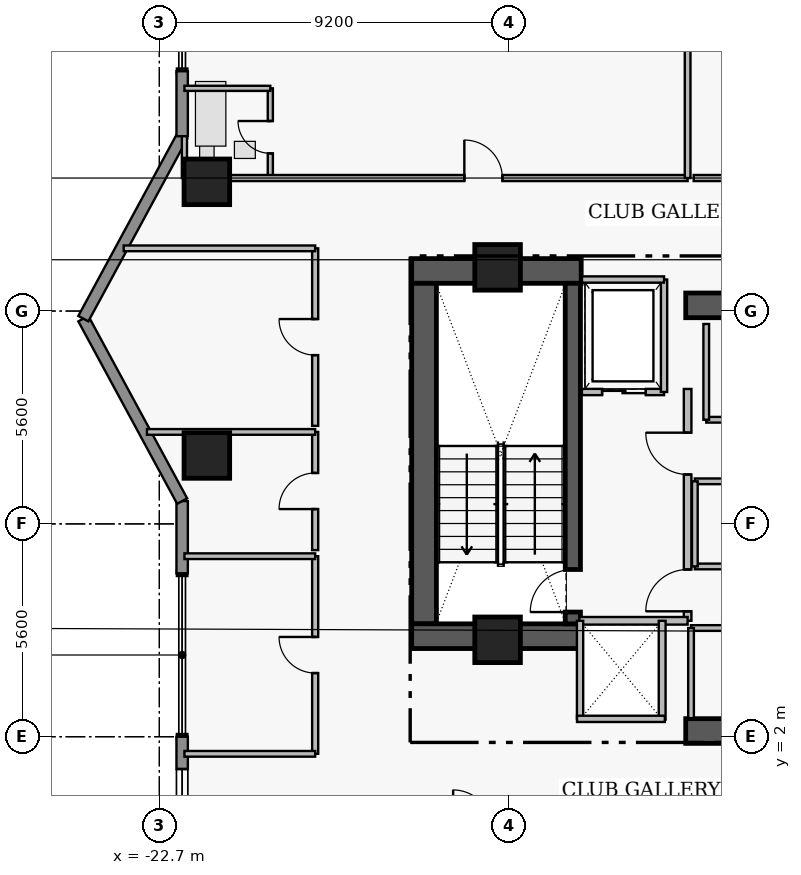
"""IFC4 building model, lengths in metres.
Left out: names, types, materials, properties, quantities, classifications, styles, units other than length and angle.
Written with IfcOpenShell. Run it as: python <this file> out.ifc"""

import sys

from ifc_helpers import new_model, si_unit, direction, frame, frame_2d, origin, origin_2d, place, context, subcontext, project, spatial, rectangle, extrude, element, fill, save


model = new_model("IFC4")
c1 = context("Model", 3, precision=1e-05, world=origin(), true_north=direction((0.0, 1.0)))
c2 = subcontext(c1, "Body", "Model", "MODEL_VIEW")
j1 = project(units=[si_unit("LENGTHUNIT", "METRE"), si_unit("PLANEANGLEUNIT", "RADIAN")], contexts=[c1])
p1 = place(None, origin())
s1 = spatial("IfcSite", under=j1, at=p1, CompositionType="ELEMENT")
p2 = place(p1, origin())
s2 = spatial("IfcBuilding", under=s1, at=p2, CompositionType="ELEMENT")
p3 = place(p2, frame((0.0, 0.0, 226.15)))
s3 = spatial("IfcBuildingStorey", under=s2, at=p3, CompositionType="ELEMENT", Elevation=226.15)
p4 = place(p3, frame((-16.06, 14.255, 0.0), z_axis=(0.0, 0.0, 1.0), x_axis=(1.0, 0.0, 0.0)))
e1 = element("IfcWall", 1, at=p4, inside=s3, PredefinedType="SHEAR", context=c2, shape_type="SweptSolid", body=[
    extrude(rectangle(XDim=4.46, YDim=0.65, at=frame_2d((2.23, 0.0))), origin(), (0.0, 0.0, 1.0), 3.56),
])
p5 = place(p3, frame((-15.735, 4.97, 0.0), z_axis=(0.0, 0.0, 1.0), x_axis=(0.0, 1.0, 0.0)))
e2 = element("IfcWall", 2, at=p5, inside=s3, PredefinedType="SHEAR", context=c2, shape_type="SweptSolid", body=[
    extrude(rectangle(XDim=8.96, YDim=0.65, at=frame_2d((4.48, 0.0))), origin(), (0.0, 0.0, 1.0), 3.56),
])
p6 = place(p3, frame((-16.06, 4.645, 0.0), z_axis=(0.0, 0.0, 1.0), x_axis=(1.0, 0.0, 0.0)))
e3 = element("IfcWall", 3, at=p6, inside=s3, PredefinedType="SHEAR", context=c2, shape_type="SweptSolid", body=[
    extrude(rectangle(XDim=4.46, YDim=0.65, at=frame_2d((2.23, 0.0))), origin(), (0.0, 0.0, 1.0), 3.56),
])
for number, where, z_axis, x_axis in (
    (4, (-8.85, 2.15, 0.0), (0.0, 0.0, 1.0), (1.0, 0.0, 0.0)),
    (5, (-8.85, 13.35, 0.0), (0.0, 0.0, 1.0), (1.0, 0.0, 0.0)),
):
    element("IfcWall", number, at=place(p3, frame(where, z_axis=z_axis, x_axis=x_axis)), inside=s3, PredefinedType="SHEAR", context=c2, shape_type="SweptSolid", body=[
        extrude(rectangle(XDim=7.6, YDim=0.65, at=frame_2d((3.8, 0.0))), origin(), (0.0, 0.0, 1.0), 3.53),
    ])
p7 = place(p3, frame((-11.82, 4.97, 0.0), z_axis=(0.0, 0.0, 1.0), x_axis=(0.0, 1.0, 0.0)))
e6 = element("IfcWall", 6, at=p7, inside=s3, PredefinedType="SHEAR", context=c2, shape_type="SweptSolid", body=[
    extrude(rectangle(XDim=8.96, YDim=0.4, at=frame_2d((4.48, 0.0))), origin(), (0.0, 0.0, 1.0), 3.56),
])
p8 = place(p7, frame((0.31, 0.0, 0.0)))
e7 = element("IfcOpeningElement", 7, at=p8, cuts=e6, PredefinedType="OPENING", context=c2, shape_type="SweptSolid", body=[
    extrude(rectangle(XDim=1.12, YDim=2.22, at=frame_2d((0.56, 1.11))), frame((0.0, 0.21, 0.0), z_axis=(0.0, -1.0, 0.0), x_axis=(1.0, 0.0, 0.0)), (0.0, 0.0, 1.0), 0.42),
])
for number, where, z_axis, x_axis in (
    (8, (-13.8, 14.35, 0.0), (0.0, 0.0, 1.0), (1.0, 0.0, 0.0)),
    (9, (-13.8, 4.55, 0.0), (0.0, 0.0, 1.0), (1.0, 0.0, 0.0)),
    (10, (-21.45, 9.4, 0.0), (0.0, 0.0, 1.0), (1.0, 0.0, 0.0)),
    (11, (-21.45, 16.6, 0.0), (0.0, 0.0, 1.0), (1.0, 0.0, 0.0)),
):
    element("IfcColumn", number, at=place(p3, frame(where, z_axis=z_axis, x_axis=x_axis)), inside=s3, PredefinedType="COLUMN", context=c2, shape_type="SweptSolid", body=[
        extrude(rectangle(XDim=1.2, YDim=1.2, at=origin_2d()), origin(), (0.0, 0.0, 1.0), 3.75),
    ])
p9 = place(p3, frame((-22.1, -4.2, 0.0), z_axis=(0.0, 0.0, 1.0), x_axis=(0.0, 1.0, 0.0)))
e12 = element("IfcWall", 12, at=p9, inside=s3, PredefinedType="STANDARD", context=c2, shape_type="SweptSolid", body=[
    extrude(rectangle(XDim=6.2, YDim=0.3, at=frame_2d((3.1, 0.0))), origin(), (0.0, 0.0, 1.0), 3.53),
])
p10 = place(p9, frame((2.045, 0.0, 0.95)))
e13 = element("IfcOpeningElement", 13, at=p10, cuts=e12, PredefinedType="OPENING", context=c2, shape_type="SweptSolid", body=[
    extrude(rectangle(XDim=1.15, YDim=1.55, at=frame_2d((0.575, 0.775))), frame((0.0, 0.16, 0.0), z_axis=(0.0, -1.0, 0.0), x_axis=(1.0, 0.0, 0.0)), (0.0, 0.0, 1.0), 0.32),
])
p11 = place(p9, frame((4.2, 0.0, 0.95)))
e14 = element("IfcOpeningElement", 14, at=p11, cuts=e12, PredefinedType="OPENING", context=c2, shape_type="SweptSolid", body=[
    extrude(rectangle(XDim=1.15, YDim=1.55, at=frame_2d((0.575, 0.775))), frame((0.0, 0.16, 0.0), z_axis=(0.0, -1.0, 0.0), x_axis=(1.0, 0.0, 0.0)), (0.0, 0.0, 1.0), 0.32),
])
p12 = place(p3, frame((-22.1, 6.3, 0.0), z_axis=(0.0, 0.0, 1.0), x_axis=(0.0, 1.0, 0.0)))
e15 = element("IfcWall", 15, at=p12, inside=s3, PredefinedType="STANDARD", context=c2, shape_type="SweptSolid", body=[
    extrude(rectangle(XDim=1.9, YDim=0.3, at=frame_2d((0.95, 0.0))), origin(), (0.0, 0.0, 1.0), 3.53),
])
for number, where, z_axis, x_axis in (
    (16, (-22.1, 8.2, 0.0), (0.0, 0.0, 1.0), (-0.476, 0.879, 0.0)),
    (17, (-24.7, 13.0, 0.0), (0.0, 0.0, 1.0), (0.476, 0.879, 0.0)),
):
    element("IfcWall", number, at=place(p3, frame(where, z_axis=z_axis, x_axis=x_axis)), inside=s3, PredefinedType="STANDARD", context=c2, shape_type="SweptSolid", body=[
        extrude(rectangle(XDim=5.459, YDim=0.3, at=frame_2d((2.729, 0.0))), origin(), (0.0, 0.0, 1.0), 3.53),
    ])
p13 = place(p3, frame((-22.1, 17.8, 0.0), z_axis=(0.0, 0.0, 1.0), x_axis=(0.0, 1.0, 0.0)))
e18 = element("IfcWall", 18, at=p13, inside=s3, PredefinedType="STANDARD", context=c2, shape_type="SweptSolid", body=[
    extrude(rectangle(XDim=1.71, YDim=0.3, at=frame_2d((0.855, 0.0))), origin(), (0.0, 0.0, 1.0), 3.53),
])
p14 = place(p3, frame((-8.8, 5.05, 0.0), z_axis=(0.0, 0.0, 1.0), x_axis=(0.0, 1.0, 0.0)))
e19 = element("IfcWall", 19, at=p14, inside=s3, PredefinedType="PARTITIONING", context=c2, shape_type="SweptSolid", body=[
    extrude(rectangle(XDim=6.1, YDim=0.2, at=frame_2d((3.05, 0.0))), origin(), (0.0, 0.0, 1.0), 3.53),
])
p15 = place(p14, frame((0.25, 0.0, 0.0)))
e20 = element("IfcOpeningElement", 20, at=p15, cuts=e19, PredefinedType="OPENING", context=c2, shape_type="SweptSolid", body=[
    extrude(rectangle(XDim=1.1, YDim=2.2, at=frame_2d((0.55, 1.1))), frame((0.0, 0.11, 0.0), z_axis=(0.0, -1.0, 0.0), x_axis=(1.0, 0.0, 0.0)), (0.0, 0.0, 1.0), 0.22),
])
p16 = place(p14, frame((3.85, 0.0, 0.0)))
e21 = element("IfcOpeningElement", 21, at=p16, cuts=e19, PredefinedType="OPENING", context=c2, shape_type="SweptSolid", body=[
    extrude(rectangle(XDim=1.1, YDim=2.2, at=frame_2d((0.55, 1.1))), frame((0.0, 0.11, 0.0), z_axis=(0.0, -1.0, 0.0), x_axis=(1.0, 0.0, 0.0)), (0.0, 0.0, 1.0), 0.22),
])
p17 = place(p3, frame((-11.58, 11.07, 0.0), z_axis=(0.0, 0.0, 1.0), x_axis=(1.0, 0.0, 0.0)))
e22 = element("IfcWall", 22, at=p17, inside=s3, PredefinedType="PARTITIONING", context=c2, shape_type="SweptSolid", body=[
    extrude(rectangle(XDim=2.16, YDim=0.165, at=frame_2d((1.08, 0.0))), origin(), (0.0, 0.0, 1.0), 3.53),
])
p18 = place(p17, frame((0.53, 0.0, 0.0)))
e23 = element("IfcOpeningElement", 23, at=p18, cuts=e22, PredefinedType="OPENING", context=c2, shape_type="SweptSolid", body=[
    extrude(rectangle(XDim=1.15, YDim=2.25, at=frame_2d((0.575, 1.125))), frame((0.0, 0.093, 0.0), z_axis=(0.0, -1.0, 0.0), x_axis=(1.0, 0.0, 0.0)), (0.0, 0.0, 1.0), 0.185),
])
p19 = place(p3, frame((-8.71, 4.86, 0.0), z_axis=(0.0, 0.0, 1.0), x_axis=(1.0, 0.0, 0.0)))
e24 = element("IfcWall", 24, at=p19, inside=s3, PredefinedType="PARTITIONING", context=c2, shape_type="SweptSolid", body=[
    extrude(rectangle(XDim=4.92, YDim=0.15, at=frame_2d((2.46, 0.0))), origin(), (0.0, 0.0, 1.0), 3.53),
])
p20 = place(p19, frame((2.01, 0.0, 0.0)))
e25 = element("IfcOpeningElement", 25, at=p20, cuts=e24, PredefinedType="OPENING", context=c2, shape_type="SweptSolid", body=[
    extrude(rectangle(XDim=0.9, YDim=2.15, at=frame_2d((0.45, 1.075))), frame((0.0, 0.085, 0.0), z_axis=(0.0, -1.0, 0.0), x_axis=(1.0, 0.0, 0.0)), (0.0, 0.0, 1.0), 0.17),
])
p21 = place(p3, frame((-8.31, 10.34, 0.0), z_axis=(0.0, 0.0, 1.0), x_axis=(1.0, 0.0, 0.0)))
e26 = element("IfcWall", 26, at=p21, inside=s3, PredefinedType="PARTITIONING", context=c2, shape_type="SweptSolid", body=[
    extrude(rectangle(XDim=4.52, YDim=0.15, at=frame_2d((2.26, 0.0))), origin(), (0.0, 0.0, 1.0), 3.53),
])
p22 = place(p21, frame((1.81, 0.0, 0.0)))
e27 = element("IfcOpeningElement", 27, at=p22, cuts=e26, PredefinedType="OPENING", context=c2, shape_type="SweptSolid", body=[
    extrude(rectangle(XDim=0.9, YDim=2.15, at=frame_2d((0.45, 1.075))), frame((0.0, 0.085, 0.0), z_axis=(0.0, -1.0, 0.0), x_axis=(1.0, 0.0, 0.0)), (0.0, 0.0, 1.0), 0.17),
])
p23 = place(p3, frame((-8.61, 8.72, 0.0), z_axis=(0.0, 0.0, 1.0), x_axis=(1.0, 0.0, 0.0)))
e28 = element("IfcWall", 28, at=p23, inside=s3, PredefinedType="PARTITIONING", context=c2, shape_type="SweptSolid", body=[
    extrude(rectangle(XDim=2.92, YDim=0.15, at=frame_2d((1.46, 0.0))), origin(), (0.0, 0.0, 1.0), 3.53),
])
p24 = place(p23, frame((1.01, 0.0, 0.0)))
e29 = element("IfcOpeningElement", 29, at=p24, cuts=e28, PredefinedType="OPENING", context=c2, shape_type="SweptSolid", body=[
    extrude(rectangle(XDim=0.9, YDim=2.15, at=frame_2d((0.45, 1.075))), frame((0.0, 0.085, 0.0), z_axis=(0.0, -1.0, 0.0), x_axis=(1.0, 0.0, 0.0)), (0.0, 0.0, 1.0), 0.17),
])
p25 = place(p3, frame((-19.78, 16.7, 0.0), z_axis=(0.0, 0.0, 1.0), x_axis=(0.0, 1.0, 0.0)))
e30 = element("IfcWall", 30, at=p25, inside=s3, PredefinedType="PLUMBINGWALL", context=c2, shape_type="SweptSolid", body=[
    extrude(rectangle(XDim=2.36, YDim=0.135, at=frame_2d((1.18, 0.0))), origin(), (0.0, 0.0, 1.0), 3.53),
])
p26 = place(p25, frame((0.65, 0.0, 0.0)))
e31 = element("IfcOpeningElement", 31, at=p26, cuts=e30, PredefinedType="OPENING", context=c2, shape_type="SweptSolid", body=[
    extrude(rectangle(XDim=0.85, YDim=2.1, at=frame_2d((0.425, 1.05))), frame((0.0, 0.077, 0.0), z_axis=(0.0, -1.0, 0.0), x_axis=(1.0, 0.0, 0.0)), (0.0, 0.0, 1.0), 0.155),
])
p27 = place(p3, frame((-22.04, 16.7, 0.0), z_axis=(0.0, 0.0, 1.0), x_axis=(1.0, 0.0, 0.0)))
e32 = element("IfcWall", 32, at=p27, inside=s3, PredefinedType="PARTITIONING", context=c2, shape_type="SweptSolid", body=[
    extrude(rectangle(XDim=13.24, YDim=0.16, at=frame_2d((6.62, 0.0))), origin(), (0.0, 0.0, 1.0), 3.124),
])
p28 = place(p27, frame((7.365, 0.0, 0.0)))
e33 = element("IfcOpeningElement", 33, at=p28, cuts=e32, PredefinedType="OPENING", context=c2, shape_type="SweptSolid", body=[
    extrude(rectangle(XDim=1.0, YDim=2.15, at=frame_2d((0.5, 1.075))), frame((0.0, 0.09, 0.0), z_axis=(0.0, -1.0, 0.0), x_axis=(1.0, 0.0, 0.0)), (0.0, 0.0, 1.0), 0.18),
])
p29 = place(p3, frame((-8.64, 16.7, 0.0), z_axis=(0.0, 0.0, 1.0), x_axis=(1.0, 0.0, 0.0)))
e34 = element("IfcWall", 34, at=p29, inside=s3, PredefinedType="PARTITIONING", context=c2, shape_type="SweptSolid", body=[
    extrude(rectangle(XDim=7.66, YDim=0.16, at=frame_2d((3.83, 0.0))), origin(), (0.0, 0.0, 1.0), 3.124),
])
p30 = place(p29, frame((5.85, 0.0, 0.0)))
e35 = element("IfcOpeningElement", 35, at=p30, cuts=e34, PredefinedType="OPENING", context=c2, shape_type="SweptSolid", body=[
    extrude(rectangle(XDim=1.08, YDim=2.18, at=frame_2d((0.54, 1.09))), frame((0.0, 0.09, 0.0), z_axis=(0.0, -1.0, 0.0), x_axis=(1.0, 0.0, 0.0)), (0.0, 0.0, 1.0), 0.18),
])
p31 = place(p3, frame((-18.6, 1.55, 0.0), z_axis=(0.0, 0.0, 1.0), x_axis=(0.0, 1.0, 0.0)))
e36 = element("IfcWall", 36, at=p31, inside=s3, PredefinedType="PARTITIONING", context=c2, shape_type="SweptSolid", body=[
    extrude(rectangle(XDim=5.2, YDim=0.16, at=frame_2d((2.6, 0.0))), origin(), (0.0, 0.0, 1.0), 3.53),
])
p32 = place(p31, frame((2.125, 0.0, 0.0)))
e37 = element("IfcOpeningElement", 37, at=p32, cuts=e36, PredefinedType="OPENING", context=c2, shape_type="SweptSolid", body=[
    extrude(rectangle(XDim=0.95, YDim=2.15, at=frame_2d((0.475, 1.075))), frame((0.0, 0.09, 0.0), z_axis=(0.0, -1.0, 0.0), x_axis=(1.0, 0.0, 0.0)), (0.0, 0.0, 1.0), 0.18),
])
p33 = place(p3, frame((-18.6, 6.91, 0.0), z_axis=(0.0, 0.0, 1.0), x_axis=(0.0, 1.0, 0.0)))
e38 = element("IfcWall", 38, at=p33, inside=s3, PredefinedType="PARTITIONING", context=c2, shape_type="SweptSolid", body=[
    extrude(rectangle(XDim=3.11, YDim=0.16, at=frame_2d((1.555, 0.0))), origin(), (0.0, 0.0, 1.0), 3.53),
])
p34 = place(p33, frame((1.08, 0.0, 0.0)))
e39 = element("IfcOpeningElement", 39, at=p34, cuts=e38, PredefinedType="OPENING", context=c2, shape_type="SweptSolid", body=[
    extrude(rectangle(XDim=0.95, YDim=2.15, at=frame_2d((0.475, 1.075))), frame((0.0, 0.09, 0.0), z_axis=(0.0, -1.0, 0.0), x_axis=(1.0, 0.0, 0.0)), (0.0, 0.0, 1.0), 0.18),
])
p35 = place(p3, frame((-18.6, 10.18, 0.0), z_axis=(0.0, 0.0, 1.0), x_axis=(0.0, 1.0, 0.0)))
e40 = element("IfcWall", 40, at=p35, inside=s3, PredefinedType="PARTITIONING", context=c2, shape_type="SweptSolid", body=[
    extrude(rectangle(XDim=4.67, YDim=0.16, at=frame_2d((2.335, 0.0))), origin(), (0.0, 0.0, 1.0), 3.53),
])
p36 = place(p35, frame((1.86, 0.0, 0.0)))
e41 = element("IfcOpeningElement", 41, at=p36, cuts=e40, PredefinedType="OPENING", context=c2, shape_type="SweptSolid", body=[
    extrude(rectangle(XDim=0.95, YDim=2.15, at=frame_2d((0.475, 1.075))), frame((0.0, 0.09, 0.0), z_axis=(0.0, -1.0, 0.0), x_axis=(1.0, 0.0, 0.0)), (0.0, 0.0, 1.0), 0.18),
])
p37 = place(p3, frame((-11.65, 5.05, 0.0), z_axis=(0.0, 0.0, 1.0), x_axis=(1.0, 0.0, 0.0)))
e42 = element("IfcWall", 42, at=p37, inside=s3, PredefinedType="PARTITIONING", context=c2, shape_type="SweptSolid", body=[
    extrude(rectangle(XDim=2.85, YDim=0.2, at=frame_2d((1.425, 0.0))), origin(), (0.0, 0.0, 1.0), 3.53),
])
p38 = place(p3, frame((-9.42, 11.07, 0.0), z_axis=(0.0, 0.0, 1.0), x_axis=(0.0, 1.0, 0.0)))
e43 = element("IfcWall", 43, at=p38, inside=s3, PredefinedType="PARTITIONING", context=c2, shape_type="SweptSolid", body=[
    extrude(rectangle(XDim=2.96, YDim=0.165, at=frame_2d((1.48, 0.0))), origin(), (0.0, 0.0, 1.0), 3.53),
])
p39 = place(p3, frame((-11.58, 14.03, 0.0), z_axis=(0.0, 0.0, 1.0), x_axis=(1.0, 0.0, 0.0)))
e44 = element("IfcWall", 44, at=p39, inside=s3, PredefinedType="PARTITIONING", context=c2, shape_type="SweptSolid", body=[
    extrude(rectangle(XDim=2.16, YDim=0.165, at=frame_2d((1.08, 0.0))), origin(), (0.0, 0.0, 1.0), 3.53),
])
p40 = place(p3, frame((-8.71, 2.49, 0.0), z_axis=(0.0, 0.0, 1.0), x_axis=(0.0, 1.0, 0.0)))
e45 = element("IfcWall", 45, at=p40, inside=s3, PredefinedType="PARTITIONING", context=c2, shape_type="SweptSolid", body=[
    extrude(rectangle(XDim=2.37, YDim=0.15, at=frame_2d((1.185, 0.0))), origin(), (0.0, 0.0, 1.0), 3.53),
])
p41 = place(p3, frame((-8.31, 10.34, 0.0), z_axis=(0.0, 0.0, 1.0), x_axis=(0.0, 1.0, 0.0)))
e46 = element("IfcWall", 46, at=p41, inside=s3, PredefinedType="PARTITIONING", context=c2, shape_type="SweptSolid", body=[
    extrude(rectangle(XDim=2.52, YDim=0.15, at=frame_2d((1.26, 0.0))), origin(), (0.0, 0.0, 1.0), 3.53),
])
p42 = place(p3, frame((-9.47, 2.45, 0.0), z_axis=(0.0, 0.0, 1.0), x_axis=(0.0, 1.0, 0.0)))
e47 = element("IfcWall", 47, at=p42, inside=s3, PredefinedType="PARTITIONING", context=c2, shape_type="SweptSolid", body=[
    extrude(rectangle(XDim=2.6, YDim=0.18, at=frame_2d((1.3, 0.0))), origin(), (0.0, 0.0, 1.0), 3.53),
])
p43 = place(p3, frame((-11.63, 2.47, 0.0), z_axis=(0.0, 0.0, 1.0), x_axis=(0.0, 1.0, 0.0)))
e48 = element("IfcWall", 48, at=p43, inside=s3, PredefinedType="PARTITIONING", context=c2, shape_type="SweptSolid", body=[
    extrude(rectangle(XDim=2.58, YDim=0.165, at=frame_2d((1.29, 0.0))), origin(), (0.0, 0.0, 1.0), 3.53),
])
p44 = place(p3, frame((-11.71, 2.47, 0.0), z_axis=(0.0, 0.0, 1.0), x_axis=(1.0, 0.0, 0.0)))
e49 = element("IfcWall", 49, at=p44, inside=s3, PredefinedType="PARTITIONING", context=c2, shape_type="SweptSolid", body=[
    extrude(rectangle(XDim=2.31, YDim=0.165, at=frame_2d((1.155, 0.0))), origin(), (0.0, 0.0, 1.0), 2.43),
])
p45 = place(p3, frame((-8.61, 6.48, 0.0), z_axis=(0.0, 0.0, 1.0), x_axis=(1.0, 0.0, 0.0)))
e50 = element("IfcWall", 50, at=p45, inside=s3, PredefinedType="PARTITIONING", context=c2, shape_type="SweptSolid", body=[
    extrude(rectangle(XDim=2.92, YDim=0.15, at=frame_2d((1.46, 0.0))), origin(), (0.0, 0.0, 1.0), 3.53),
])
p46 = place(p3, frame((-8.61, 6.48, 0.0), z_axis=(0.0, 0.0, 1.0), x_axis=(0.0, 1.0, 0.0)))
e51 = element("IfcWall", 51, at=p46, inside=s3, PredefinedType="PARTITIONING", context=c2, shape_type="SweptSolid", body=[
    extrude(rectangle(XDim=2.24, YDim=0.15, at=frame_2d((1.12, 0.0))), origin(), (0.0, 0.0, 1.0), 3.53),
])
p47 = place(p3, frame((-22.04, 19.06, 0.0), z_axis=(0.0, 0.0, 1.0), x_axis=(1.0, 0.0, 0.0)))
e52 = element("IfcWall", 52, at=p47, inside=s3, PredefinedType="PLUMBINGWALL", context=c2, shape_type="SweptSolid", body=[
    extrude(rectangle(XDim=2.26, YDim=0.135, at=frame_2d((1.13, 0.0))), origin(), (0.0, 0.0, 1.0), 3.53),
])
p48 = place(p3, frame((-22.04, 16.7, 0.0), z_axis=(0.0, 0.0, 1.0), x_axis=(0.0, 1.0, 0.0)))
e53 = element("IfcWall", 53, at=p48, inside=s3, PredefinedType="PLUMBINGWALL", context=c2, shape_type="SweptSolid", body=[
    extrude(rectangle(XDim=1.1, YDim=0.135, at=frame_2d((0.55, 0.0))), origin(), (0.0, 0.0, 1.0), 3.53),
])
p49 = place(p3, frame((-8.8, 16.7, 0.0), z_axis=(0.0, 0.0, 1.0), x_axis=(0.0, 1.0, 0.0)))
e54 = element("IfcWall", 54, at=p49, inside=s3, PredefinedType="PARTITIONING", context=c2, shape_type="SweptSolid", body=[
    extrude(rectangle(XDim=8.3, YDim=0.15, at=frame_2d((4.15, 0.0))), origin(), (0.0, 0.0, 1.0), 3.53),
])
for number, where, z_axis, x_axis in (
    (55, (-22.04, 1.55, 0.0), (0.0, 0.0, 1.0), (1.0, 0.0, 0.0)),
    (56, (-22.04, 6.75, 0.0), (0.0, 0.0, 1.0), (1.0, 0.0, 0.0)),
):
    element("IfcWall", number, at=place(p3, frame(where, z_axis=z_axis, x_axis=x_axis)), inside=s3, PredefinedType="PARTITIONING", context=c2, shape_type="SweptSolid", body=[
        extrude(rectangle(XDim=3.44, YDim=0.15, at=frame_2d((1.72, 0.0))), origin(), (0.0, 0.0, 1.0), 3.53),
    ])
p50 = place(p3, frame((-23.026, 10.02, 0.0), z_axis=(0.0, 0.0, 1.0), x_axis=(1.0, 0.0, 0.0)))
e57 = element("IfcWall", 57, at=p50, inside=s3, PredefinedType="PARTITIONING", context=c2, shape_type="SweptSolid", body=[
    extrude(rectangle(XDim=4.426, YDim=0.15, at=frame_2d((2.213, 0.0))), origin(), (0.0, 0.0, 1.0), 3.53),
])
p51 = place(p3, frame((-23.638, 14.85, 0.0), z_axis=(0.0, 0.0, 1.0), x_axis=(1.0, 0.0, 0.0)))
e58 = element("IfcWall", 58, at=p51, inside=s3, PredefinedType="PARTITIONING", context=c2, shape_type="SweptSolid", body=[
    extrude(rectangle(XDim=5.038, YDim=0.15, at=frame_2d((2.519, 0.0))), origin(), (0.0, 0.0, 1.0), 3.53),
])
p52 = place(p11, origin())
e59 = element("IfcWindow", 59, at=p52, inside=s3, PartitioningType="SINGLE_PANEL", PredefinedType="WINDOW", context=c2, shape_type="SweptSolid", body=[
    extrude(rectangle(XDim=1.15, YDim=1.55, at=frame_2d((0.575, 0.775))), frame((0.0, 0.03, 0.0), z_axis=(0.0, -1.0, 0.0), x_axis=(1.0, 0.0, 0.0)), (0.0, 0.0, 1.0), 0.06),
])
fill(e14, e59)
p53 = place(p8, origin())
e60 = element("IfcDoor", 60, at=p53, inside=s3, OperationType="SINGLE_SWING_LEFT", PredefinedType="DOOR", context=c2, shape_type="SweptSolid", body=[
    extrude(rectangle(XDim=1.12, YDim=2.22, at=frame_2d((0.56, 1.11))), frame((0.0, 0.025, 0.0), z_axis=(0.0, -1.0, 0.0), x_axis=(1.0, 0.0, 0.0)), (0.0, 0.0, 1.0), 0.05),
])
fill(e7, e60)
p54 = place(p15, origin())
e61 = element("IfcDoor", 61, at=p54, inside=s3, OperationType="SINGLE_SWING_LEFT", PredefinedType="DOOR", context=c2, shape_type="SweptSolid", body=[
    extrude(rectangle(XDim=1.1, YDim=2.2, at=frame_2d((0.55, 1.1))), frame((0.0, 0.025, 0.0), z_axis=(0.0, -1.0, 0.0), x_axis=(1.0, 0.0, 0.0)), (0.0, 0.0, 1.0), 0.05),
])
fill(e20, e61)
p55 = place(p16, origin())
e62 = element("IfcDoor", 62, at=p55, inside=s3, OperationType="SINGLE_SWING_RIGHT", PredefinedType="DOOR", context=c2, shape_type="SweptSolid", body=[
    extrude(rectangle(XDim=1.1, YDim=2.2, at=frame_2d((0.55, 1.1))), frame((0.0, 0.025, 0.0), z_axis=(0.0, -1.0, 0.0), x_axis=(1.0, 0.0, 0.0)), (0.0, 0.0, 1.0), 0.05),
])
fill(e21, e62)
p56 = place(p18, origin())
e63 = element("IfcDoor", 63, at=p56, inside=s3, OperationType="SLIDING_TO_LEFT", PredefinedType="DOOR", context=c2, shape_type="SweptSolid", body=[
    extrude(rectangle(XDim=1.15, YDim=2.25, at=frame_2d((0.575, 1.125))), frame((0.0, 0.025, 0.0), z_axis=(0.0, -1.0, 0.0), x_axis=(1.0, 0.0, 0.0)), (0.0, 0.0, 1.0), 0.05),
])
fill(e23, e63)
p57 = place(p26, origin())
e64 = element("IfcDoor", 64, at=p57, inside=s3, OperationType="SINGLE_SWING_RIGHT", PredefinedType="DOOR", context=c2, shape_type="SweptSolid", body=[
    extrude(rectangle(XDim=0.85, YDim=2.1, at=frame_2d((0.425, 1.05))), frame((0.0, 0.025, 0.0), z_axis=(0.0, -1.0, 0.0), x_axis=(1.0, 0.0, 0.0)), (0.0, 0.0, 1.0), 0.05),
])
fill(e31, e64)
p58 = place(p28, origin())
e65 = element("IfcDoor", 65, at=p58, inside=s3, OperationType="SINGLE_SWING_LEFT", PredefinedType="DOOR", context=c2, shape_type="SweptSolid", body=[
    extrude(rectangle(XDim=1.0, YDim=2.15, at=frame_2d((0.5, 1.075))), frame((0.0, 0.025, 0.0), z_axis=(0.0, -1.0, 0.0), x_axis=(1.0, 0.0, 0.0)), (0.0, 0.0, 1.0), 0.05),
])
fill(e33, e65)
p59 = place(p32, origin())
e66 = element("IfcDoor", 66, at=p59, inside=s3, OperationType="SINGLE_SWING_RIGHT", PredefinedType="DOOR", context=c2, shape_type="SweptSolid", body=[
    extrude(rectangle(XDim=0.95, YDim=2.15, at=frame_2d((0.475, 1.075))), frame((0.0, 0.025, 0.0), z_axis=(0.0, -1.0, 0.0), x_axis=(1.0, 0.0, 0.0)), (0.0, 0.0, 1.0), 0.05),
])
fill(e37, e66)
p60 = place(p34, origin())
e67 = element("IfcDoor", 67, at=p60, inside=s3, OperationType="SINGLE_SWING_LEFT", PredefinedType="DOOR", context=c2, shape_type="SweptSolid", body=[
    extrude(rectangle(XDim=0.95, YDim=2.15, at=frame_2d((0.475, 1.075))), frame((0.0, 0.025, 0.0), z_axis=(0.0, -1.0, 0.0), x_axis=(1.0, 0.0, 0.0)), (0.0, 0.0, 1.0), 0.05),
])
fill(e39, e67)
p61 = place(p36, origin())
e68 = element("IfcDoor", 68, at=p61, inside=s3, OperationType="SINGLE_SWING_RIGHT", PredefinedType="DOOR", context=c2, shape_type="SweptSolid", body=[
    extrude(rectangle(XDim=0.95, YDim=2.15, at=frame_2d((0.475, 1.075))), frame((0.0, 0.025, 0.0), z_axis=(0.0, -1.0, 0.0), x_axis=(1.0, 0.0, 0.0)), (0.0, 0.0, 1.0), 0.05),
])
fill(e41, e68)
save(model, sys.argv[1])
